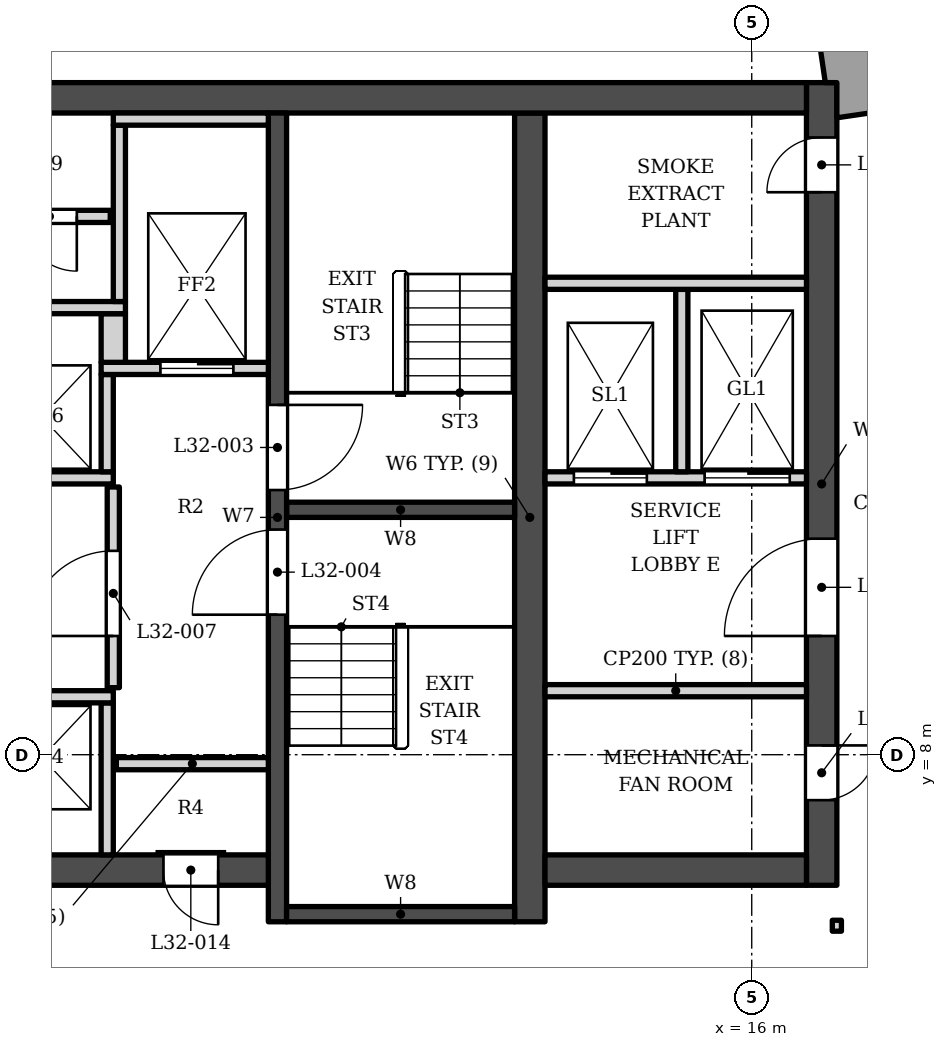
"""IFC4 building model, lengths in metres.
Left out: names, types, materials, properties, quantities, classifications, styles, units other than length and angle.
Written with IfcOpenShell. Run it as: python <this file> out.ifc"""

import sys

from ifc_helpers import new_model, si_unit, direction, frame, frame_2d, origin, place, context, subcontext, project, spatial, polyline, rectangle, outline, extrude, element, fill, save


model = new_model("IFC4")
c1 = context("Model", 3, precision=1e-05, world=origin(), true_north=direction((0.0, 1.0)))
c2 = subcontext(c1, "Body", "Model", "MODEL_VIEW")
j1 = project(units=[si_unit("LENGTHUNIT", "METRE"), si_unit("PLANEANGLEUNIT", "RADIAN")], contexts=[c1])
p1 = place(None, origin())
s1 = spatial("IfcSite", under=j1, at=p1, CompositionType="ELEMENT")
p2 = place(p1, origin())
s2 = spatial("IfcBuilding", under=s1, at=p2, CompositionType="ELEMENT")
p3 = place(p2, frame((0.0, 0.0, 139.6)))
s3 = spatial("IfcBuildingStorey", under=s2, at=p3, CompositionType="ELEMENT", Elevation=139.6)
p4 = place(p3, frame((-16.9, 18.802, 0.0), z_axis=(0.0, 0.0, 1.0), x_axis=(1.0, 0.0, 0.0)))
e1 = element("IfcWall", 1, at=p4, inside=s3, PredefinedType="SHEAR", context=c2, shape_type="SweptSolid", body=[
    extrude(rectangle(XDim=33.8, YDim=0.5, at=frame_2d((16.9, 0.0))), origin(), (0.0, 0.0, 1.0), 5.0),
])
p5 = place(p3, frame((12.35, 5.253, 0.0), z_axis=(0.0, 0.0, 1.0), x_axis=(0.0, 1.0, 0.0)))
e2 = element("IfcWall", 2, at=p5, inside=s3, PredefinedType="SHEAR", context=c2, shape_type="SweptSolid", body=[
    extrude(rectangle(XDim=13.3, YDim=0.5, at=frame_2d((6.65, 0.0))), origin(), (0.0, 0.0, 1.0), 5.0),
])
p6 = place(p3, frame((8.2, 5.253, 0.0), z_axis=(0.0, 0.0, 1.0), x_axis=(0.0, 1.0, 0.0)))
e3 = element("IfcWall", 3, at=p6, inside=s3, PredefinedType="SHEAR", context=c2, shape_type="SweptSolid", body=[
    extrude(rectangle(XDim=13.3, YDim=0.3, at=frame_2d((6.65, 0.0))), origin(), (0.0, 0.0, 1.0), 5.0),
])
p7 = place(p6, frame((7.1, 0.0, 0.0)))
e4 = element("IfcOpeningElement", 4, at=p7, cuts=e3, PredefinedType="OPENING", context=c2, shape_type="SweptSolid", body=[
    extrude(rectangle(XDim=1.4, YDim=2.1, at=frame_2d((0.7, 1.05))), frame((0.0, 0.16, 0.0), z_axis=(0.0, -1.0, 0.0), x_axis=(1.0, 0.0, 0.0)), (0.0, 0.0, 1.0), 0.32),
])
p8 = place(p6, frame((5.05, 0.0, 0.0)))
e5 = element("IfcOpeningElement", 5, at=p8, cuts=e3, PredefinedType="OPENING", context=c2, shape_type="SweptSolid", body=[
    extrude(rectangle(XDim=1.4, YDim=2.1, at=frame_2d((0.7, 1.05))), frame((0.0, 0.16, 0.0), z_axis=(0.0, -1.0, 0.0), x_axis=(1.0, 0.0, 0.0)), (0.0, 0.0, 1.0), 0.32),
])
for number, where, z_axis, x_axis in (
    (6, (8.35, 12.028, 0.0), (0.0, 0.0, 1.0), (1.0, 0.0, 0.0)),
    (7, (8.35, 5.378, 0.0), (0.0, 0.0, 1.0), (1.0, 0.0, 0.0)),
):
    element("IfcWall", number, at=place(p3, frame(where, z_axis=z_axis, x_axis=x_axis)), inside=s3, PredefinedType="SHEAR", context=c2, shape_type="SweptSolid", body=[
        extrude(rectangle(XDim=3.75, YDim=0.25, at=frame_2d((1.875, 0.0))), origin(), (0.0, 0.0, 1.0), 5.0),
    ])
p9 = place(p3, frame((1.0, 6.103, 0.0), z_axis=(0.0, 0.0, 1.0), x_axis=(1.0, 0.0, 0.0)))
e8 = element("IfcWall", 8, at=p9, inside=s3, PredefinedType="SHEAR", context=c2, shape_type="SweptSolid", body=[
    extrude(rectangle(XDim=7.05, YDim=0.5, at=frame_2d((3.525, 0.0))), origin(), (0.0, 0.0, 1.0), 5.0),
])
p10 = place(p9, frame((5.325, 0.0, 0.0)))
e9 = element("IfcOpeningElement", 9, at=p10, cuts=e8, PredefinedType="OPENING", context=c2, shape_type="SweptSolid", body=[
    extrude(rectangle(XDim=0.9, YDim=2.1, at=frame_2d((0.45, 1.05))), frame((0.0, 0.26, 0.0), z_axis=(0.0, -1.0, 0.0), x_axis=(1.0, 0.0, 0.0)), (0.0, 0.0, 1.0), 0.52),
])
p11 = place(p3, frame((12.6, 6.103, 0.0), z_axis=(0.0, 0.0, 1.0), x_axis=(1.0, 0.0, 0.0)))
e10 = element("IfcWall", 10, at=p11, inside=s3, PredefinedType="SHEAR", context=c2, shape_type="SweptSolid", body=[
    extrude(rectangle(XDim=4.3, YDim=0.5, at=frame_2d((2.15, 0.0))), origin(), (0.0, 0.0, 1.0), 5.0),
])
p12 = place(p3, frame((17.15, 5.853, 0.0), z_axis=(0.0, 0.0, 1.0), x_axis=(0.0, 1.0, 0.0)))
e11 = element("IfcWall", 11, at=p12, inside=s3, PredefinedType="SHEAR", context=c2, shape_type="SweptSolid", body=[
    extrude(rectangle(XDim=13.2, YDim=0.5, at=frame_2d((6.6, 0.0))), origin(), (0.0, 0.0, 1.0), 5.0),
])
p13 = place(p12, frame((4.1, 0.0, 0.0)))
e12 = element("IfcOpeningElement", 12, at=p13, cuts=e11, PredefinedType="OPENING", context=c2, shape_type="SweptSolid", body=[
    extrude(rectangle(XDim=1.6, YDim=2.1, at=frame_2d((0.8, 1.05))), frame((0.0, 0.26, 0.0), z_axis=(0.0, -1.0, 0.0), x_axis=(1.0, 0.0, 0.0)), (0.0, 0.0, 1.0), 0.52),
])
p14 = place(p12, frame((1.4, 0.0, 0.0)))
e13 = element("IfcOpeningElement", 13, at=p14, cuts=e11, PredefinedType="OPENING", context=c2, shape_type="SweptSolid", body=[
    extrude(rectangle(XDim=0.9, YDim=2.1, at=frame_2d((0.45, 1.05))), frame((0.0, 0.26, 0.0), z_axis=(0.0, -1.0, 0.0), x_axis=(1.0, 0.0, 0.0)), (0.0, 0.0, 1.0), 0.52),
])
p15 = place(p12, frame((11.397, 0.0, 0.0)))
e14 = element("IfcOpeningElement", 14, at=p15, cuts=e11, PredefinedType="OPENING", context=c2, shape_type="SweptSolid", body=[
    extrude(rectangle(XDim=0.9, YDim=2.1, at=frame_2d((0.45, 1.05))), frame((0.0, 0.26, 0.0), z_axis=(0.0, -1.0, 0.0), x_axis=(1.0, 0.0, 0.0)), (0.0, 0.0, 1.0), 0.52),
])
p16 = place(p3, origin())
e15 = element("IfcWall", 15, at=p16, inside=s3, PredefinedType="SOLIDWALL", context=c2, shape_type="SweptSolid", body=[
    extrude(outline(polyline([(18.664, 18.659), (18.49, 19.847), (17.123, 19.646), (17.21, 19.052), (17.4, 19.052), (17.4, 18.474), (18.664, 18.659)])), origin(), (0.0, 0.0, 1.0), 3.5),
])
for number, where, z_axis, x_axis in (
    (16, (5.4, 6.353, 0.0), (0.0, 0.0, 1.0), (0.0, 1.0, 0.0)),
    (17, (5.55, 7.853, 0.0), (0.0, 0.0, 1.0), (1.0, 0.0, 0.0)),
):
    element("IfcWall", number, at=place(p3, frame(where, z_axis=z_axis, x_axis=x_axis)), inside=s3, PredefinedType="SOLIDWALL", context=c2, shape_type="SweptSolid", body=[
        extrude(rectangle(XDim=2.5, YDim=0.2, at=frame_2d((1.25, 0.0))), origin(), (0.0, 0.0, 1.0), 4.83),
    ])
p17 = place(p3, frame((1.0, 8.953, 0.0), z_axis=(0.0, 0.0, 1.0), x_axis=(1.0, 0.0, 0.0)))
e18 = element("IfcWall", 18, at=p17, inside=s3, PredefinedType="SOLIDWALL", context=c2, shape_type="SweptSolid", body=[
    extrude(rectangle(XDim=4.5, YDim=0.2, at=frame_2d((2.25, 0.0))), origin(), (0.0, 0.0, 1.0), 4.83),
])
p18 = place(p3, frame((12.6, 9.052, 0.0), z_axis=(0.0, 0.0, 1.0), x_axis=(1.0, 0.0, 0.0)))
e19 = element("IfcWall", 19, at=p18, inside=s3, PredefinedType="PARTITIONING", context=c2, shape_type="SweptSolid", body=[
    extrude(rectangle(XDim=4.3, YDim=0.2, at=frame_2d((2.15, 0.0))), origin(), (0.0, 0.0, 1.0), 4.83),
])
p19 = place(p3, frame((5.5, 9.103, 0.0), z_axis=(0.0, 0.0, 1.0), x_axis=(0.0, 1.0, 0.0)))
e20 = element("IfcWall", 20, at=p19, inside=s3, PredefinedType="SOLIDWALL", context=c2, shape_type="SweptSolid", body=[
    extrude(rectangle(XDim=3.3, YDim=0.2, at=frame_2d((1.65, 0.0))), origin(), (0.0, 0.0, 1.0), 4.83),
])
p20 = place(p19, frame((0.85, 0.0, 0.0)))
e21 = element("IfcOpeningElement", 21, at=p20, cuts=e20, PredefinedType="OPENING", context=c2, shape_type="SweptSolid", body=[
    extrude(rectangle(XDim=1.4, YDim=2.1, at=frame_2d((0.7, 1.05))), frame((0.0, 0.11, 0.0), z_axis=(0.0, -1.0, 0.0), x_axis=(1.0, 0.0, 0.0)), (0.0, 0.0, 1.0), 0.22),
])
p21 = place(p3, frame((-1.5, 12.552, 0.0), z_axis=(0.0, 0.0, 1.0), x_axis=(1.0, 0.0, 0.0)))
e22 = element("IfcWall", 22, at=p21, inside=s3, PredefinedType="SOLIDWALL", context=c2, shape_type="SweptSolid", body=[
    extrude(rectangle(XDim=7.0, YDim=0.2, at=frame_2d((3.5, 0.0))), origin(), (0.0, 0.0, 1.0), 4.83),
])
p22 = place(p3, frame((12.6, 12.552, 0.0), z_axis=(0.0, 0.0, 1.0), x_axis=(1.0, 0.0, 0.0)))
e23 = element("IfcWall", 23, at=p22, inside=s3, PredefinedType="SOLIDWALL", context=c2, shape_type="SweptSolid", body=[
    extrude(rectangle(XDim=4.3, YDim=0.2, at=frame_2d((2.15, 0.0))), origin(), (0.0, 0.0, 1.0), 4.83),
])
p23 = place(p22, frame((0.475, 0.0, 0.0)))
e24 = element("IfcOpeningElement", 24, at=p23, cuts=e23, PredefinedType="OPENING", context=c2, shape_type="SweptSolid", body=[
    extrude(rectangle(XDim=1.2, YDim=2.1, at=frame_2d((0.6, 1.05))), frame((0.0, 0.11, 0.0), z_axis=(0.0, -1.0, 0.0), x_axis=(1.0, 0.0, 0.0)), (0.0, 0.0, 1.0), 0.22),
])
p24 = place(p22, frame((2.625, 0.0, 0.0)))
e25 = element("IfcOpeningElement", 25, at=p24, cuts=e23, PredefinedType="OPENING", context=c2, shape_type="SweptSolid", body=[
    extrude(rectangle(XDim=1.4, YDim=2.1, at=frame_2d((0.7, 1.05))), frame((0.0, 0.11, 0.0), z_axis=(0.0, -1.0, 0.0), x_axis=(1.0, 0.0, 0.0)), (0.0, 0.0, 1.0), 0.22),
])
p25 = place(p3, frame((5.4, 12.653, 0.0), z_axis=(0.0, 0.0, 1.0), x_axis=(0.0, 1.0, 0.0)))
e26 = element("IfcWall", 26, at=p25, inside=s3, PredefinedType="SOLIDWALL", context=c2, shape_type="SweptSolid", body=[
    extrude(rectangle(XDim=1.6, YDim=0.2, at=frame_2d((0.8, 0.0))), origin(), (0.0, 0.0, 1.0), 4.83),
])
p26 = place(p3, frame((14.85, 12.653, 0.0), z_axis=(0.0, 0.0, 1.0), x_axis=(0.0, 1.0, 0.0)))
e27 = element("IfcWall", 27, at=p26, inside=s3, PredefinedType="SOLIDWALL", context=c2, shape_type="SweptSolid", body=[
    extrude(rectangle(XDim=3.0, YDim=0.2, at=frame_2d((1.5, 0.0))), origin(), (0.0, 0.0, 1.0), 4.83),
])
p27 = place(p3, frame((5.3, 14.353, 0.0), z_axis=(0.0, 0.0, 1.0), x_axis=(1.0, 0.0, 0.0)))
e28 = element("IfcWall", 28, at=p27, inside=s3, PredefinedType="SOLIDWALL", context=c2, shape_type="SweptSolid", body=[
    extrude(rectangle(XDim=2.75, YDim=0.2, at=frame_2d((1.375, 0.0))), origin(), (0.0, 0.0, 1.0), 4.83),
])
p28 = place(p27, frame((0.975, 0.0, 0.0)))
e29 = element("IfcOpeningElement", 29, at=p28, cuts=e28, PredefinedType="OPENING", context=c2, shape_type="SweptSolid", body=[
    extrude(rectangle(XDim=1.2, YDim=2.1, at=frame_2d((0.6, 1.05))), frame((0.0, 0.11, 0.0), z_axis=(0.0, -1.0, 0.0), x_axis=(1.0, 0.0, 0.0)), (0.0, 0.0, 1.0), 0.22),
])
p29 = place(p3, frame((5.5, 14.453, 0.0), z_axis=(0.0, 0.0, 1.0), x_axis=(0.0, 1.0, 0.0)))
e30 = element("IfcWall", 30, at=p29, inside=s3, PredefinedType="SOLIDWALL", context=c2, shape_type="SweptSolid", body=[
    extrude(rectangle(XDim=0.8, YDim=0.4, at=frame_2d((0.4, 0.0))), origin(), (0.0, 0.0, 1.0), 4.83),
])
p30 = place(p3, frame((-1.5, 15.353, 0.0), z_axis=(0.0, 0.0, 1.0), x_axis=(1.0, 0.0, 0.0)))
e31 = element("IfcWall", 31, at=p30, inside=s3, PredefinedType="SOLIDWALL", context=c2, shape_type="SweptSolid", body=[
    extrude(rectangle(XDim=7.2, YDim=0.2, at=frame_2d((3.6, 0.0))), origin(), (0.0, 0.0, 1.0), 4.83),
])
p31 = place(p3, frame((5.6, 15.453, 0.0), z_axis=(0.0, 0.0, 1.0), x_axis=(0.0, 1.0, 0.0)))
e32 = element("IfcWall", 32, at=p31, inside=s3, PredefinedType="SOLIDWALL", context=c2, shape_type="SweptSolid", body=[
    extrude(rectangle(XDim=2.9, YDim=0.2, at=frame_2d((1.45, 0.0))), origin(), (0.0, 0.0, 1.0), 4.83),
])
p32 = place(p3, frame((12.6, 15.753, 0.0), z_axis=(0.0, 0.0, 1.0), x_axis=(1.0, 0.0, 0.0)))
e33 = element("IfcWall", 33, at=p32, inside=s3, PredefinedType="SOLIDWALL", context=c2, shape_type="SweptSolid", body=[
    extrude(rectangle(XDim=4.3, YDim=0.2, at=frame_2d((2.15, 0.0))), origin(), (0.0, 0.0, 1.0), 4.83),
])
p33 = place(p3, frame((-1.6, 16.853, 0.0), z_axis=(0.0, 0.0, 1.0), x_axis=(1.0, 0.0, 0.0)))
e34 = element("IfcWall", 34, at=p33, inside=s3, PredefinedType="SOLIDWALL", context=c2, shape_type="SweptSolid", body=[
    extrude(rectangle(XDim=7.05, YDim=0.2, at=frame_2d((3.525, 0.0))), origin(), (0.0, 0.0, 1.0), 4.83),
])
p34 = place(p33, frame((0.875, 0.0, 0.0)))
e35 = element("IfcOpeningElement", 35, at=p34, cuts=e34, PredefinedType="OPENING", context=c2, shape_type="SweptSolid", body=[
    extrude(rectangle(XDim=0.9, YDim=2.1, at=frame_2d((0.45, 1.05))), frame((0.0, 0.11, 0.0), z_axis=(0.0, -1.0, 0.0), x_axis=(1.0, 0.0, 0.0)), (0.0, 0.0, 1.0), 0.22),
])
p35 = place(p33, frame((3.325, 0.0, 0.0)))
e36 = element("IfcOpeningElement", 36, at=p35, cuts=e34, PredefinedType="OPENING", context=c2, shape_type="SweptSolid", body=[
    extrude(rectangle(XDim=0.9, YDim=2.1, at=frame_2d((0.45, 1.05))), frame((0.0, 0.11, 0.0), z_axis=(0.0, -1.0, 0.0), x_axis=(1.0, 0.0, 0.0)), (0.0, 0.0, 1.0), 0.22),
])
p36 = place(p33, frame((5.6, 0.0, 0.0)))
e37 = element("IfcOpeningElement", 37, at=p36, cuts=e34, PredefinedType="OPENING", context=c2, shape_type="SweptSolid", body=[
    extrude(rectangle(XDim=0.9, YDim=2.1, at=frame_2d((0.45, 1.05))), frame((0.0, 0.11, 0.0), z_axis=(0.0, -1.0, 0.0), x_axis=(1.0, 0.0, 0.0)), (0.0, 0.0, 1.0), 0.22),
])
p37 = place(p3, frame((5.5, 18.453, 0.0), z_axis=(0.0, 0.0, 1.0), x_axis=(1.0, 0.0, 0.0)))
e38 = element("IfcWall", 38, at=p37, inside=s3, PredefinedType="SOLIDWALL", context=c2, shape_type="SweptSolid", body=[
    extrude(rectangle(XDim=2.55, YDim=0.2, at=frame_2d((1.275, 0.0))), origin(), (0.0, 0.0, 1.0), 4.83),
])
p38 = place(p3, frame((17.4, 5.098, 0.0), z_axis=(0.0, 0.0, 1.0), x_axis=(0.0, 1.0, 0.0)))
e39 = element("IfcWall", 39, at=p38, inside=s3, PredefinedType="PARTITIONING", context=c2, shape_type="SweptSolid", body=[
    extrude(rectangle(XDim=0.18, YDim=0.15, at=frame_2d((0.09, 0.0))), origin(), (0.0, 0.0, 1.0), 4.05),
])
p39 = place(p28, origin())
e40 = element("IfcDoor", 40, at=p39, inside=s3, OperationType="DOUBLE_DOOR_SLIDING", PredefinedType="DOOR", context=c2, shape_type="SweptSolid", body=[
    extrude(rectangle(XDim=1.2, YDim=2.1, at=frame_2d((0.6, 1.05))), frame((0.0, 0.025, 0.0), z_axis=(0.0, -1.0, 0.0), x_axis=(1.0, 0.0, 0.0)), (0.0, 0.0, 1.0), 0.05),
])
fill(e29, e40)
p40 = place(p23, origin())
e41 = element("IfcDoor", 41, at=p40, inside=s3, OperationType="DOUBLE_DOOR_SLIDING", PredefinedType="DOOR", context=c2, shape_type="SweptSolid", body=[
    extrude(rectangle(XDim=1.2, YDim=2.1, at=frame_2d((0.6, 1.05))), frame((0.0, 0.025, 0.0), z_axis=(0.0, -1.0, 0.0), x_axis=(1.0, 0.0, 0.0)), (0.0, 0.0, 1.0), 0.05),
])
fill(e24, e41)
p41 = place(p24, origin())
e42 = element("IfcDoor", 42, at=p41, inside=s3, OperationType="DOUBLE_DOOR_SLIDING", PredefinedType="DOOR", context=c2, shape_type="SweptSolid", body=[
    extrude(rectangle(XDim=1.4, YDim=2.1, at=frame_2d((0.7, 1.05))), frame((0.0, 0.025, 0.0), z_axis=(0.0, -1.0, 0.0), x_axis=(1.0, 0.0, 0.0)), (0.0, 0.0, 1.0), 0.05),
])
fill(e25, e42)
p42 = place(p7, origin())
e43 = element("IfcDoor", 43, at=p42, inside=s3, OperationType="SINGLE_SWING_RIGHT", PredefinedType="DOOR", context=c2, shape_type="SweptSolid", body=[
    extrude(rectangle(XDim=1.4, YDim=2.1, at=frame_2d((0.7, 1.05))), frame((0.0, 0.025, 0.0), z_axis=(0.0, -1.0, 0.0), x_axis=(1.0, 0.0, 0.0)), (0.0, 0.0, 1.0), 0.05),
])
fill(e4, e43)
p43 = place(p8, origin())
e44 = element("IfcDoor", 44, at=p43, inside=s3, OperationType="SINGLE_SWING_LEFT", PredefinedType="DOOR", context=c2, shape_type="SweptSolid", body=[
    extrude(rectangle(XDim=1.4, YDim=2.1, at=frame_2d((0.7, 1.05))), frame((0.0, 0.025, 0.0), z_axis=(0.0, -1.0, 0.0), x_axis=(1.0, 0.0, 0.0)), (0.0, 0.0, 1.0), 0.05),
])
fill(e5, e44)
p44 = place(p20, origin())
e45 = element("IfcDoor", 45, at=p44, inside=s3, OperationType="SINGLE_SWING_LEFT", PredefinedType="DOOR", context=c2, shape_type="SweptSolid", body=[
    extrude(rectangle(XDim=1.4, YDim=2.1, at=frame_2d((0.7, 1.05))), frame((0.0, 0.025, 0.0), z_axis=(0.0, -1.0, 0.0), x_axis=(1.0, 0.0, 0.0)), (0.0, 0.0, 1.0), 0.05),
])
fill(e21, e45)
p45 = place(p36, origin())
e46 = element("IfcDoor", 46, at=p45, inside=s3, OperationType="SINGLE_SWING_RIGHT", PredefinedType="DOOR", context=c2, shape_type="SweptSolid", body=[
    extrude(rectangle(XDim=0.9, YDim=2.1, at=frame_2d((0.45, 1.05))), frame((0.0, 0.025, 0.0), z_axis=(0.0, -1.0, 0.0), x_axis=(1.0, 0.0, 0.0)), (0.0, 0.0, 1.0), 0.05),
])
fill(e37, e46)
p46 = place(p10, origin())
e47 = element("IfcDoor", 47, at=p46, inside=s3, OperationType="SINGLE_SWING_RIGHT", PredefinedType="DOOR", context=c2, shape_type="SweptSolid", body=[
    extrude(rectangle(XDim=0.9, YDim=2.1, at=frame_2d((0.45, 1.05))), frame((0.0, 0.025, 0.0), z_axis=(0.0, -1.0, 0.0), x_axis=(1.0, 0.0, 0.0)), (0.0, 0.0, 1.0), 0.05),
])
fill(e9, e47)
p47 = place(p13, origin())
e48 = element("IfcDoor", 48, at=p47, inside=s3, OperationType="DOUBLE_DOOR_SINGLE_SWING", PredefinedType="DOOR", context=c2, shape_type="SweptSolid", body=[
    extrude(rectangle(XDim=1.6, YDim=2.1, at=frame_2d((0.8, 1.05))), frame((0.0, 0.025, 0.0), z_axis=(0.0, -1.0, 0.0), x_axis=(1.0, 0.0, 0.0)), (0.0, 0.0, 1.0), 0.05),
])
fill(e12, e48)
p48 = place(p14, origin())
e49 = element("IfcDoor", 49, at=p48, inside=s3, OperationType="SINGLE_SWING_RIGHT", PredefinedType="DOOR", context=c2, shape_type="SweptSolid", body=[
    extrude(rectangle(XDim=0.9, YDim=2.1, at=frame_2d((0.45, 1.05))), frame((0.0, 0.025, 0.0), z_axis=(0.0, -1.0, 0.0), x_axis=(1.0, 0.0, 0.0)), (0.0, 0.0, 1.0), 0.05),
])
fill(e13, e49)
p49 = place(p15, origin())
e50 = element("IfcDoor", 50, at=p49, inside=s3, OperationType="SINGLE_SWING_LEFT", PredefinedType="DOOR", context=c2, shape_type="SweptSolid", body=[
    extrude(rectangle(XDim=0.9, YDim=2.1, at=frame_2d((0.45, 1.05))), frame((0.0, 0.025, 0.0), z_axis=(0.0, -1.0, 0.0), x_axis=(1.0, 0.0, 0.0)), (0.0, 0.0, 1.0), 0.05),
])
fill(e14, e50)
save(model, sys.argv[1])
